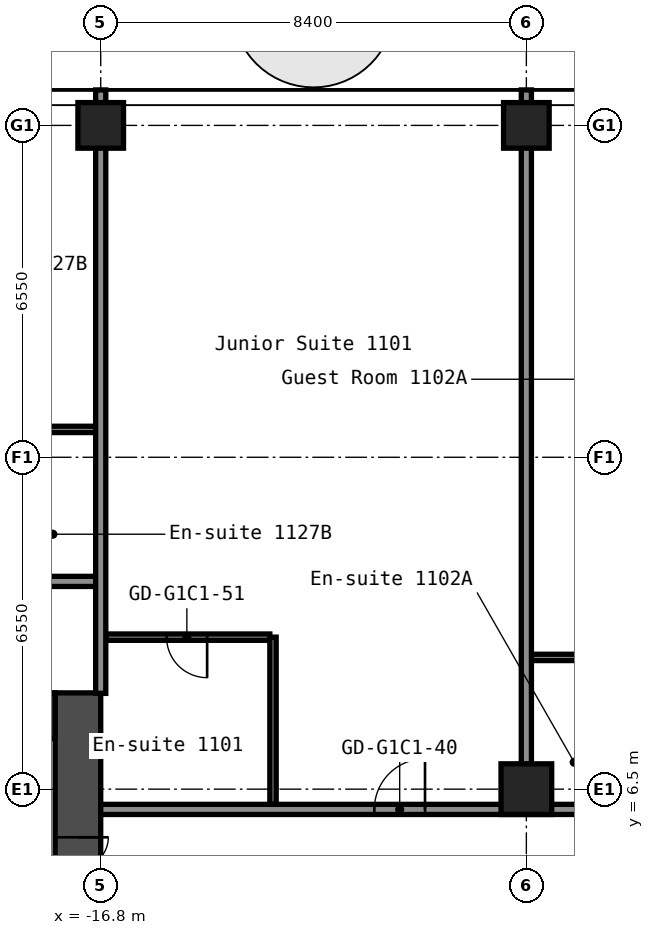
"""IFC4 building model, lengths in metres.
Left out: names, types, materials, properties, quantities, classifications, styles, units other than length and angle.
Written with IfcOpenShell. Run it as: python <this file> out.ifc"""

import sys

from ifc_helpers import new_model, si_unit, direction, frame, frame_2d, origin, origin_2d, place, context, subcontext, project, spatial, rectangle, hollow_rectangle, extrude, element, fill, save


model = new_model("IFC4")
c1 = context("Model", 3, precision=1e-05, world=origin(), true_north=direction((0.0, 1.0)))
c2 = subcontext(c1, "Body", "Model", "MODEL_VIEW")
j1 = project(units=[si_unit("LENGTHUNIT", "METRE"), si_unit("PLANEANGLEUNIT", "RADIAN")], contexts=[c1])
p1 = place(None, origin())
s1 = spatial("IfcSite", under=j1, at=p1, CompositionType="ELEMENT")
p2 = place(p1, origin())
s2 = spatial("IfcBuilding", under=s1, at=p2, CompositionType="ELEMENT")
p3 = place(p2, frame((0.0, 0.0, 42.2)))
s3 = spatial("IfcBuildingStorey", under=s2, at=p3, CompositionType="ELEMENT", Elevation=42.2)
p4 = place(p3, frame((-16.8, 19.6, 0.0), z_axis=(0.0, 0.0, 1.0), x_axis=(1.0, 0.0, 0.0)))
e1 = element("IfcColumn", 1, at=p4, inside=s3, PredefinedType="COLUMN", context=c2, shape_type="SweptSolid", body=[
    extrude(hollow_rectangle(XDim=0.9, YDim=0.9, WallThickness=0.036, at=origin_2d()), origin(), (0.0, 0.0, 1.0), 2.8),
])
p5 = place(p3, frame((-8.4, 6.5, 0.0), z_axis=(0.0, 0.0, 1.0), x_axis=(1.0, 0.0, 0.0)))
e2 = element("IfcColumn", 2, at=p5, inside=s3, PredefinedType="COLUMN", context=c2, shape_type="SweptSolid", body=[
    extrude(hollow_rectangle(XDim=1.0, YDim=1.0, WallThickness=0.04, at=origin_2d()), origin(), (0.0, 0.0, 1.0), 2.8),
])
p6 = place(p3, frame((-8.4, 19.6, 0.0), z_axis=(0.0, 0.0, 1.0), x_axis=(1.0, 0.0, 0.0)))
e3 = element("IfcColumn", 3, at=p6, inside=s3, PredefinedType="COLUMN", context=c2, shape_type="SweptSolid", body=[
    extrude(hollow_rectangle(XDim=0.9, YDim=0.9, WallThickness=0.036, at=origin_2d()), origin(), (0.0, 0.0, 1.0), 2.8),
])
p7 = place(p3, frame((-17.25, -8.4, 0.0), z_axis=(0.0, 0.0, 1.0), x_axis=(0.0, 1.0, 0.0)))
e4 = element("IfcWall", 4, at=p7, inside=s3, PredefinedType="SHEAR", context=c2, shape_type="SweptSolid", body=[
    extrude(rectangle(XDim=16.8, YDim=0.9, at=frame_2d((8.4, 0.0))), origin(), (0.0, 0.0, 1.0), 2.8),
])
p8 = place(p7, frame((12.75, 0.0, 0.0)))
e5 = element("IfcOpeningElement", 5, at=p8, cuts=e4, PredefinedType="OPENING", context=c2, shape_type="SweptSolid", body=[
    extrude(rectangle(XDim=1.2, YDim=2.1, at=frame_2d((0.6, 1.05))), frame((0.0, 0.46, 0.0), z_axis=(0.0, -1.0, 0.0), x_axis=(1.0, 0.0, 0.0)), (0.0, 0.0, 1.0), 0.92),
])
p9 = place(p7, frame((2.85, 0.0, 0.0)))
e6 = element("IfcOpeningElement", 6, at=p9, cuts=e4, PredefinedType="OPENING", context=c2, shape_type="SweptSolid", body=[
    extrude(rectangle(XDim=1.2, YDim=2.1, at=frame_2d((0.6, 1.05))), frame((0.0, 0.46, 0.0), z_axis=(0.0, -1.0, 0.0), x_axis=(1.0, 0.0, 0.0)), (0.0, 0.0, 1.0), 0.92),
])
p10 = place(p3, frame((-32.7, 7.95, 0.0), z_axis=(0.0, 0.0, 1.0), x_axis=(1.0, 0.0, 0.0)))
e7 = element("IfcWall", 7, at=p10, inside=s3, PredefinedType="SHEAR", context=c2, shape_type="SweptSolid", body=[
    extrude(rectangle(XDim=15.0, YDim=0.9, at=frame_2d((7.5, 0.0))), origin(), (0.0, 0.0, 1.0), 2.8),
])
p11 = place(p10, frame((3.4, 0.0, 0.0)))
e8 = element("IfcOpeningElement", 8, at=p11, cuts=e7, PredefinedType="OPENING", context=c2, shape_type="SweptSolid", body=[
    extrude(rectangle(XDim=1.2, YDim=2.1, at=frame_2d((0.6, 1.05))), frame((0.0, 0.46, 0.0), z_axis=(0.0, -1.0, 0.0), x_axis=(1.0, 0.0, 0.0)), (0.0, 0.0, 1.0), 0.92),
])
p12 = place(p10, frame((0.75, 0.0, 0.0)))
e9 = element("IfcOpeningElement", 9, at=p12, cuts=e7, PredefinedType="OPENING", context=c2, shape_type="SweptSolid", body=[
    extrude(rectangle(XDim=0.9, YDim=2.1, at=frame_2d((0.45, 1.05))), frame((0.0, 0.46, 0.0), z_axis=(0.0, -1.0, 0.0), x_axis=(1.0, 0.0, 0.0)), (0.0, 0.0, 1.0), 0.92),
])
p13 = place(p3, frame((-16.8, 6.1, 0.0), z_axis=(0.0, 0.0, 1.0), x_axis=(1.0, 0.0, 0.0)))
e10 = element("IfcWall", 10, at=p13, inside=s3, PredefinedType="PARTITIONING", context=c2, shape_type="SweptSolid", body=[
    extrude(rectangle(XDim=33.6, YDim=0.2, at=frame_2d((16.8, 0.0))), origin(), (0.0, 0.0, 1.0), 2.8),
])
p14 = place(p13, frame((5.4, 0.0, 0.0)))
e11 = element("IfcOpeningElement", 11, at=p14, cuts=e10, PredefinedType="OPENING", context=c2, shape_type="SweptSolid", body=[
    extrude(rectangle(XDim=1.0, YDim=2.1, at=frame_2d((0.5, 1.05))), frame((0.0, 0.11, 0.0), z_axis=(0.0, -1.0, 0.0), x_axis=(1.0, 0.0, 0.0)), (0.0, 0.0, 1.0), 0.22),
])
p15 = place(p13, frame((11.25, 0.0, 0.0)))
e12 = element("IfcOpeningElement", 12, at=p15, cuts=e10, PredefinedType="OPENING", context=c2, shape_type="SweptSolid", body=[
    extrude(rectangle(XDim=1.0, YDim=2.1, at=frame_2d((0.5, 1.05))), frame((0.0, 0.11, 0.0), z_axis=(0.0, -1.0, 0.0), x_axis=(1.0, 0.0, 0.0)), (0.0, 0.0, 1.0), 0.22),
])
p16 = place(p13, frame((12.95, 0.0, 0.0)))
e13 = element("IfcOpeningElement", 13, at=p16, cuts=e10, PredefinedType="OPENING", context=c2, shape_type="SweptSolid", body=[
    extrude(rectangle(XDim=1.0, YDim=2.1, at=frame_2d((0.5, 1.05))), frame((0.0, 0.11, 0.0), z_axis=(0.0, -1.0, 0.0), x_axis=(1.0, 0.0, 0.0)), (0.0, 0.0, 1.0), 0.22),
])
p17 = place(p13, frame((18.28, 0.0, 0.0)))
e14 = element("IfcOpeningElement", 14, at=p17, cuts=e10, PredefinedType="OPENING", context=c2, shape_type="SweptSolid", body=[
    extrude(rectangle(XDim=0.9, YDim=2.1, at=frame_2d((0.45, 1.05))), frame((0.0, 0.11, 0.0), z_axis=(0.0, -1.0, 0.0), x_axis=(1.0, 0.0, 0.0)), (0.0, 0.0, 1.0), 0.22),
])
p18 = place(p13, frame((22.48, 0.0, 0.0)))
e15 = element("IfcOpeningElement", 15, at=p18, cuts=e10, PredefinedType="OPENING", context=c2, shape_type="SweptSolid", body=[
    extrude(rectangle(XDim=0.9, YDim=2.1, at=frame_2d((0.45, 1.05))), frame((0.0, 0.11, 0.0), z_axis=(0.0, -1.0, 0.0), x_axis=(1.0, 0.0, 0.0)), (0.0, 0.0, 1.0), 0.22),
])
p19 = place(p13, frame((28.05, 0.0, 0.0)))
e16 = element("IfcOpeningElement", 16, at=p19, cuts=e10, PredefinedType="OPENING", context=c2, shape_type="SweptSolid", body=[
    extrude(rectangle(XDim=1.0, YDim=2.1, at=frame_2d((0.5, 1.05))), frame((0.0, 0.11, 0.0), z_axis=(0.0, -1.0, 0.0), x_axis=(1.0, 0.0, 0.0)), (0.0, 0.0, 1.0), 0.22),
])
p20 = place(p13, frame((29.75, 0.0, 0.0)))
e17 = element("IfcOpeningElement", 17, at=p20, cuts=e10, PredefinedType="OPENING", context=c2, shape_type="SweptSolid", body=[
    extrude(rectangle(XDim=1.0, YDim=2.1, at=frame_2d((0.5, 1.05))), frame((0.0, 0.11, 0.0), z_axis=(0.0, -1.0, 0.0), x_axis=(1.0, 0.0, 0.0)), (0.0, 0.0, 1.0), 0.22),
])
p21 = place(p3, frame((-8.3, 9.1, 0.0), z_axis=(0.0, 0.0, 1.0), x_axis=(1.0, 0.0, 0.0)))
e18 = element("IfcWall", 18, at=p21, inside=s3, PredefinedType="PARTITIONING", context=c2, shape_type="SweptSolid", body=[
    extrude(rectangle(XDim=2.338, YDim=0.125, at=frame_2d((1.169, 0.0))), origin(), (0.0, 0.0, 1.0), 2.8),
])
p22 = place(p3, frame((-16.7, 9.5, 0.0), z_axis=(0.0, 0.0, 1.0), x_axis=(1.0, 0.0, 0.0)))
e19 = element("IfcWall", 19, at=p22, inside=s3, PredefinedType="PARTITIONING", context=c2, shape_type="SweptSolid", body=[
    extrude(rectangle(XDim=3.238, YDim=0.125, at=frame_2d((1.619, 0.0))), origin(), (0.0, 0.0, 1.0), 2.8),
])
p23 = place(p22, frame((1.2, 0.0, 0.0)))
e20 = element("IfcOpeningElement", 20, at=p23, cuts=e19, PredefinedType="OPENING", context=c2, shape_type="SweptSolid", body=[
    extrude(rectangle(XDim=0.8, YDim=2.1, at=frame_2d((0.4, 1.05))), frame((0.0, 0.073, 0.0), z_axis=(0.0, -1.0, 0.0), x_axis=(1.0, 0.0, 0.0)), (0.0, 0.0, 1.0), 0.145),
])
p24 = place(p3, frame((-51.1, 10.6, 0.0), z_axis=(0.0, 0.0, 1.0), x_axis=(1.0, 0.0, 0.0)))
e21 = element("IfcWall", 21, at=p24, inside=s3, PredefinedType="PARTITIONING", context=c2, shape_type="SweptSolid", body=[
    extrude(rectangle(XDim=34.3, YDim=0.2, at=frame_2d((17.15, 0.0))), origin(), (0.0, 0.0, 1.0), 2.8),
])
p25 = place(p24, frame((2.5, 0.0, 0.0)))
e22 = element("IfcOpeningElement", 22, at=p25, cuts=e21, PredefinedType="OPENING", context=c2, shape_type="SweptSolid", body=[
    extrude(rectangle(XDim=1.0, YDim=2.1, at=frame_2d((0.5, 1.05))), frame((0.0, 0.11, 0.0), z_axis=(0.0, -1.0, 0.0), x_axis=(1.0, 0.0, 0.0)), (0.0, 0.0, 1.0), 0.22),
])
p26 = place(p24, frame((11.95, 0.0, 0.0)))
e23 = element("IfcOpeningElement", 23, at=p26, cuts=e21, PredefinedType="OPENING", context=c2, shape_type="SweptSolid", body=[
    extrude(rectangle(XDim=1.0, YDim=2.1, at=frame_2d((0.5, 1.05))), frame((0.0, 0.11, 0.0), z_axis=(0.0, -1.0, 0.0), x_axis=(1.0, 0.0, 0.0)), (0.0, 0.0, 1.0), 0.22),
])
p27 = place(p24, frame((13.65, 0.0, 0.0)))
e24 = element("IfcOpeningElement", 24, at=p27, cuts=e21, PredefinedType="OPENING", context=c2, shape_type="SweptSolid", body=[
    extrude(rectangle(XDim=1.0, YDim=2.1, at=frame_2d((0.5, 1.05))), frame((0.0, 0.11, 0.0), z_axis=(0.0, -1.0, 0.0), x_axis=(1.0, 0.0, 0.0)), (0.0, 0.0, 1.0), 0.22),
])
p28 = place(p24, frame((22.9, 0.0, 0.0)))
e25 = element("IfcOpeningElement", 25, at=p28, cuts=e21, PredefinedType="OPENING", context=c2, shape_type="SweptSolid", body=[
    extrude(rectangle(XDim=1.0, YDim=2.1, at=frame_2d((0.5, 1.05))), frame((0.0, 0.11, 0.0), z_axis=(0.0, -1.0, 0.0), x_axis=(1.0, 0.0, 0.0)), (0.0, 0.0, 1.0), 0.22),
])
p29 = place(p24, frame((28.75, 0.0, 0.0)))
e26 = element("IfcOpeningElement", 26, at=p29, cuts=e21, PredefinedType="OPENING", context=c2, shape_type="SweptSolid", body=[
    extrude(rectangle(XDim=1.0, YDim=2.1, at=frame_2d((0.5, 1.05))), frame((0.0, 0.11, 0.0), z_axis=(0.0, -1.0, 0.0), x_axis=(1.0, 0.0, 0.0)), (0.0, 0.0, 1.0), 0.22),
])
p30 = place(p24, frame((30.45, 0.0, 0.0)))
e27 = element("IfcOpeningElement", 27, at=p30, cuts=e21, PredefinedType="OPENING", context=c2, shape_type="SweptSolid", body=[
    extrude(rectangle(XDim=1.0, YDim=2.1, at=frame_2d((0.5, 1.05))), frame((0.0, 0.11, 0.0), z_axis=(0.0, -1.0, 0.0), x_axis=(1.0, 0.0, 0.0)), (0.0, 0.0, 1.0), 0.22),
])
p31 = place(p3, frame((-19.238, 13.6, 0.0), z_axis=(0.0, 0.0, 1.0), x_axis=(1.0, 0.0, 0.0)))
e28 = element("IfcWall", 28, at=p31, inside=s3, PredefinedType="PARTITIONING", context=c2, shape_type="SweptSolid", body=[
    extrude(rectangle(XDim=2.338, YDim=0.125, at=frame_2d((1.169, 0.0))), origin(), (0.0, 0.0, 1.0), 2.8),
])
p32 = place(p3, frame((-16.8, 8.39, 0.0), z_axis=(0.0, 0.0, 1.0), x_axis=(0.0, 1.0, 0.0)))
e29 = element("IfcWall", 29, at=p32, inside=s3, PredefinedType="PARTITIONING", context=c2, shape_type="SweptSolid", body=[
    extrude(rectangle(XDim=11.91, YDim=0.2, at=frame_2d((5.955, 0.0))), origin(), (0.0, 0.0, 1.0), 2.8),
])
p33 = place(p3, frame((-13.4, 6.2, 0.0), z_axis=(0.0, 0.0, 1.0), x_axis=(0.0, 1.0, 0.0)))
e30 = element("IfcWall", 30, at=p33, inside=s3, PredefinedType="PARTITIONING", context=c2, shape_type="SweptSolid", body=[
    extrude(rectangle(XDim=3.3, YDim=0.125, at=frame_2d((1.65, 0.0))), origin(), (0.0, 0.0, 1.0), 2.8),
])
p34 = place(p3, frame((-8.4, 6.99, 0.0), z_axis=(0.0, 0.0, 1.0), x_axis=(0.0, 1.0, 0.0)))
e31 = element("IfcWall", 31, at=p34, inside=s3, PredefinedType="PARTITIONING", context=c2, shape_type="SweptSolid", body=[
    extrude(rectangle(XDim=13.31, YDim=0.2, at=frame_2d((6.655, 0.0))), origin(), (0.0, 0.0, 1.0), 2.8),
])
p35 = place(p8, origin())
e32 = element("IfcDoor", 32, at=p35, inside=s3, OperationType="DOUBLE_DOOR_SINGLE_SWING", PredefinedType="DOOR", context=c2, shape_type="SweptSolid", body=[
    extrude(rectangle(XDim=1.2, YDim=2.1, at=frame_2d((0.6, 1.05))), frame((0.0, 0.025, 0.0), z_axis=(0.0, -1.0, 0.0), x_axis=(1.0, 0.0, 0.0)), (0.0, 0.0, 1.0), 0.05),
])
fill(e5, e32)
p36 = place(p14, origin())
e33 = element("IfcDoor", 33, at=p36, inside=s3, OperationType="SINGLE_SWING_LEFT", PredefinedType="DOOR", context=c2, shape_type="SweptSolid", body=[
    extrude(rectangle(XDim=1.0, YDim=2.1, at=frame_2d((0.5, 1.05))), frame((0.0, 0.025, 0.0), z_axis=(0.0, -1.0, 0.0), x_axis=(1.0, 0.0, 0.0)), (0.0, 0.0, 1.0), 0.05),
])
fill(e11, e33)
p37 = place(p23, origin())
e34 = element("IfcDoor", 34, at=p37, inside=s3, OperationType="SINGLE_SWING_RIGHT", PredefinedType="DOOR", context=c2, shape_type="SweptSolid", body=[
    extrude(rectangle(XDim=0.8, YDim=2.1, at=frame_2d((0.4, 1.05))), frame((0.0, 0.025, 0.0), z_axis=(0.0, -1.0, 0.0), x_axis=(1.0, 0.0, 0.0)), (0.0, 0.0, 1.0), 0.05),
])
fill(e20, e34)
save(model, sys.argv[1])
